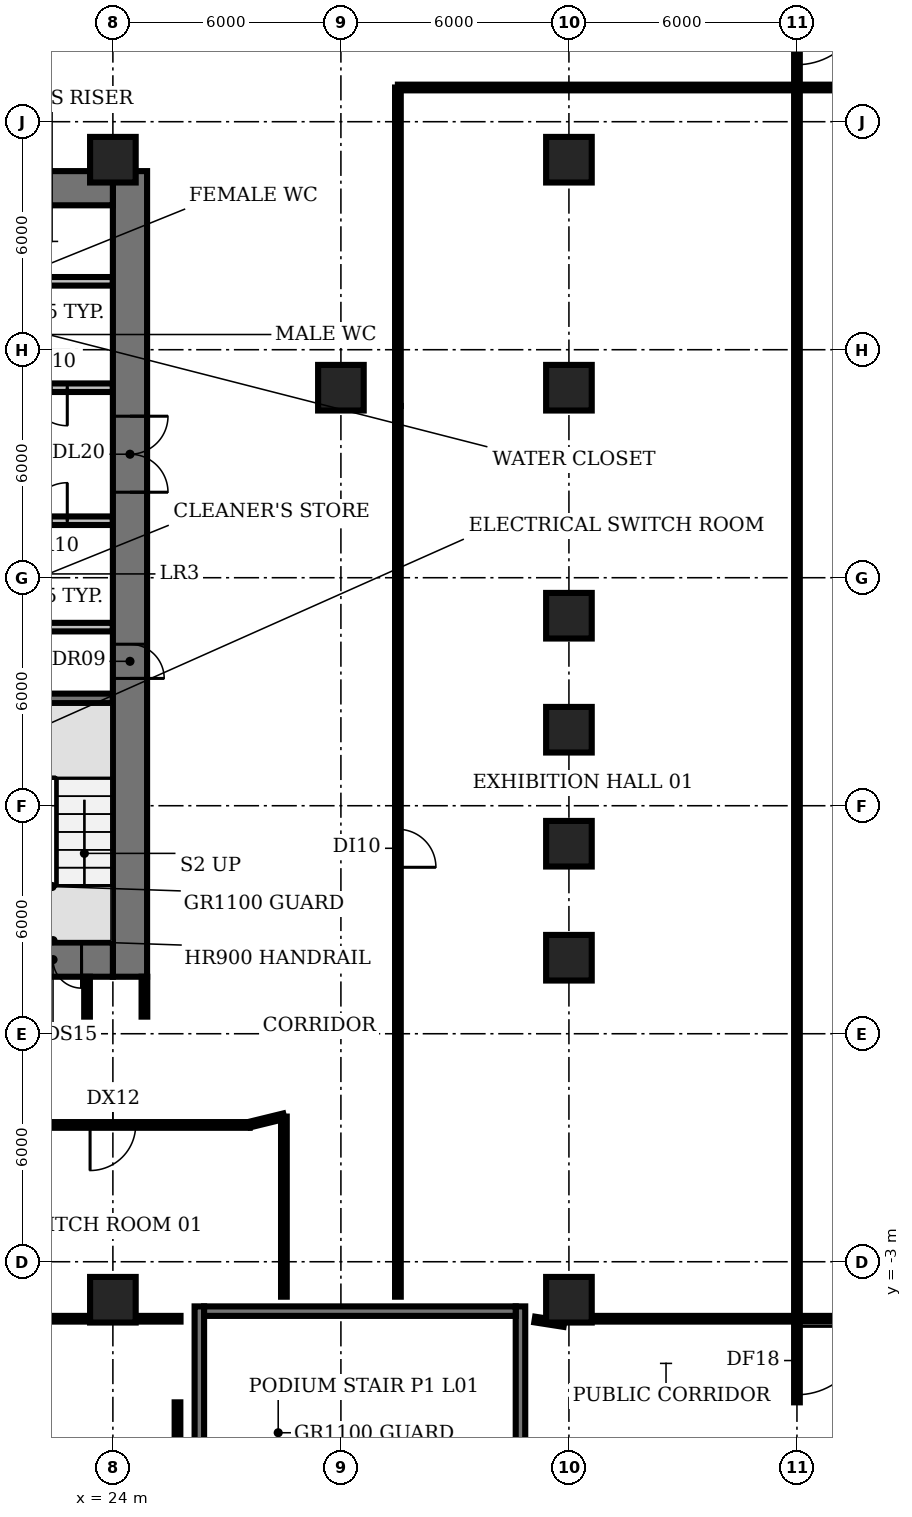
"""IFC4 building model, lengths in metres.
Left out: names, types, materials, properties, quantities, classifications, styles, units other than length and angle.
Written with IfcOpenShell. Run it as: python <this file> out.ifc"""

import sys

from ifc_helpers import new_model, si_unit, direction, frame, frame_2d, origin, origin_2d, place, context, subcontext, project, spatial, rectangle, extrude, element, fill, save


model = new_model("IFC4")
c1 = context("Model", 3, precision=1e-05, world=origin(), true_north=direction((0.0, 1.0)))
c2 = subcontext(c1, "Body", "Model", "MODEL_VIEW")
j1 = project(units=[si_unit("LENGTHUNIT", "METRE"), si_unit("PLANEANGLEUNIT", "RADIAN")], contexts=[c1])
p1 = place(None, origin())
s1 = spatial("IfcSite", under=j1, at=p1, CompositionType="ELEMENT")
p2 = place(p1, origin())
s2 = spatial("IfcBuilding", under=s1, at=p2, CompositionType="ELEMENT")
p3 = place(p2, frame((0.0, 0.0, 6.0)))
s3 = spatial("IfcBuildingStorey", under=s2, at=p3, CompositionType="ELEMENT", Elevation=6.0)
for number, where, z_axis, x_axis in (
    (1, (24.0, -4.0, 0.0), (0.0, 0.0, 1.0), (1.0, 0.0, 0.0)),
    (2, (24.0, 26.0, 0.0), (0.0, 0.0, 1.0), (1.0, 0.0, 0.0)),
    (3, (30.0, 20.0, 0.0), (0.0, 0.0, 1.0), (1.0, 0.0, 0.0)),
    (4, (36.0, -4.0, 0.0), (0.0, 0.0, 1.0), (1.0, 0.0, 0.0)),
    (5, (36.0, 5.0, 0.0), (0.0, 0.0, 1.0), (1.0, 0.0, 0.0)),
    (6, (36.0, 8.0, 0.0), (0.0, 0.0, 1.0), (1.0, 0.0, 0.0)),
    (7, (36.0, 11.0, 0.0), (0.0, 0.0, 1.0), (1.0, 0.0, 0.0)),
    (8, (36.0, 14.0, 0.0), (0.0, 0.0, 1.0), (1.0, 0.0, 0.0)),
    (9, (36.0, 20.0, 0.0), (0.0, 0.0, 1.0), (1.0, 0.0, 0.0)),
    (10, (36.0, 26.0, 0.0), (0.0, 0.0, 1.0), (1.0, 0.0, 0.0)),
):
    element("IfcColumn", number, at=place(p3, frame(where, z_axis=z_axis, x_axis=x_axis)), inside=s3, PredefinedType="COLUMN", context=c2, shape_type="SweptSolid", body=[
        extrude(rectangle(XDim=1.2, YDim=1.2, at=origin_2d()), origin(), (0.0, 0.0, 1.0), 4.6),
    ])
p4 = place(p3, frame((20.85, 11.825, 0.0), z_axis=(0.0, 0.0, 1.0), x_axis=(1.0, 0.0, 0.0)))
e11 = element("IfcWall", 11, at=p4, inside=s3, PredefinedType="SHEAR", context=c2, shape_type="SweptSolid", body=[
    extrude(rectangle(XDim=3.15, YDim=0.25, at=frame_2d((1.575, 0.0))), origin(), (0.0, 0.0, 1.0), 4.6),
])
p5 = place(p3, frame((16.6, 13.7, 0.0), z_axis=(0.0, 0.0, 1.0), x_axis=(1.0, 0.0, 0.0)))
e12 = element("IfcWall", 12, at=p5, inside=s3, PredefinedType="PARTITIONING", context=c2, shape_type="SweptSolid", body=[
    extrude(rectangle(XDim=7.4, YDim=0.225, at=frame_2d((3.7, 0.0))), origin(), (0.0, 0.0, 1.0), 4.6),
])
p6 = place(p3, frame((9.4, 16.5, 0.0), z_axis=(0.0, 0.0, 1.0), x_axis=(1.0, 0.0, 0.0)))
e13 = element("IfcWall", 13, at=p6, inside=s3, PredefinedType="PARTITIONING", context=c2, shape_type="SweptSolid", body=[
    extrude(rectangle(XDim=14.6, YDim=0.225, at=frame_2d((7.3, 0.0))), origin(), (0.0, 0.0, 1.0), 4.6),
])
p7 = place(p6, frame((0.75, 0.0, 0.0)))
e14 = element("IfcOpeningElement", 14, at=p7, cuts=e13, PredefinedType="OPENING", context=c2, shape_type="SweptSolid", body=[
    extrude(rectangle(XDim=1.1, YDim=2.1, at=frame_2d((0.55, 1.05))), frame((0.0, 0.123, 0.0), z_axis=(0.0, -1.0, 0.0), x_axis=(1.0, 0.0, 0.0)), (0.0, 0.0, 1.0), 0.245),
])
p8 = place(p6, frame((3.55, 0.0, 0.0)))
e15 = element("IfcOpeningElement", 15, at=p8, cuts=e13, PredefinedType="OPENING", context=c2, shape_type="SweptSolid", body=[
    extrude(rectangle(XDim=1.1, YDim=2.1, at=frame_2d((0.55, 1.05))), frame((0.0, 0.123, 0.0), z_axis=(0.0, -1.0, 0.0), x_axis=(1.0, 0.0, 0.0)), (0.0, 0.0, 1.0), 0.245),
])
p9 = place(p6, frame((6.35, 0.0, 0.0)))
e16 = element("IfcOpeningElement", 16, at=p9, cuts=e13, PredefinedType="OPENING", context=c2, shape_type="SweptSolid", body=[
    extrude(rectangle(XDim=1.1, YDim=2.1, at=frame_2d((0.55, 1.05))), frame((0.0, 0.123, 0.0), z_axis=(0.0, -1.0, 0.0), x_axis=(1.0, 0.0, 0.0)), (0.0, 0.0, 1.0), 0.245),
])
p10 = place(p6, frame((9.15, 0.0, 0.0)))
e17 = element("IfcOpeningElement", 17, at=p10, cuts=e13, PredefinedType="OPENING", context=c2, shape_type="SweptSolid", body=[
    extrude(rectangle(XDim=1.1, YDim=2.1, at=frame_2d((0.55, 1.05))), frame((0.0, 0.123, 0.0), z_axis=(0.0, -1.0, 0.0), x_axis=(1.0, 0.0, 0.0)), (0.0, 0.0, 1.0), 0.245),
])
p11 = place(p6, frame((12.4, 0.0, 0.0)))
e18 = element("IfcOpeningElement", 18, at=p11, cuts=e13, PredefinedType="OPENING", context=c2, shape_type="SweptSolid", body=[
    extrude(rectangle(XDim=1.0, YDim=2.1, at=frame_2d((0.5, 1.05))), frame((0.0, 0.123, 0.0), z_axis=(0.0, -1.0, 0.0), x_axis=(1.0, 0.0, 0.0)), (0.0, 0.0, 1.0), 0.245),
])
p12 = place(p3, frame((24.0, 20.0, 0.0), z_axis=(0.0, 0.0, 1.0), x_axis=(-1.0, 0.0, 0.0)))
e19 = element("IfcWall", 19, at=p12, inside=s3, PredefinedType="PARTITIONING", context=c2, shape_type="SweptSolid", body=[
    extrude(rectangle(XDim=14.6, YDim=0.225, at=frame_2d((7.3, 0.0))), origin(), (0.0, 0.0, 1.0), 4.6),
])
p13 = place(p12, frame((11.35, 0.0, 0.0)))
e20 = element("IfcOpeningElement", 20, at=p13, cuts=e19, PredefinedType="OPENING", context=c2, shape_type="SweptSolid", body=[
    extrude(rectangle(XDim=1.0, YDim=2.1, at=frame_2d((0.5, 1.05))), frame((0.0, 0.123, 0.0), z_axis=(0.0, -1.0, 0.0), x_axis=(1.0, 0.0, 0.0)), (0.0, 0.0, 1.0), 0.245),
])
p14 = place(p12, frame((5.775, 0.0, 0.0)))
e21 = element("IfcOpeningElement", 21, at=p14, cuts=e19, PredefinedType="OPENING", context=c2, shape_type="SweptSolid", body=[
    extrude(rectangle(XDim=1.0, YDim=2.1, at=frame_2d((0.5, 1.05))), frame((0.0, 0.123, 0.0), z_axis=(0.0, -1.0, 0.0), x_axis=(1.0, 0.0, 0.0)), (0.0, 0.0, 1.0), 0.245),
])
p15 = place(p12, frame((1.2, 0.0, 0.0)))
e22 = element("IfcOpeningElement", 22, at=p15, cuts=e19, PredefinedType="OPENING", context=c2, shape_type="SweptSolid", body=[
    extrude(rectangle(XDim=1.0, YDim=2.1, at=frame_2d((0.5, 1.05))), frame((0.0, 0.123, 0.0), z_axis=(0.0, -1.0, 0.0), x_axis=(1.0, 0.0, 0.0)), (0.0, 0.0, 1.0), 0.245),
])
p16 = place(p3, frame((9.4, 22.8, 0.0), z_axis=(0.0, 0.0, 1.0), x_axis=(1.0, 0.0, 0.0)))
e23 = element("IfcWall", 23, at=p16, inside=s3, PredefinedType="PARTITIONING", context=c2, shape_type="SweptSolid", body=[
    extrude(rectangle(XDim=14.6, YDim=0.225, at=frame_2d((7.3, 0.0))), origin(), (0.0, 0.0, 1.0), 4.6),
])
p17 = place(p3, frame((24.45, 25.7, 0.0), z_axis=(0.0, 0.0, 1.0), x_axis=(0.0, -1.0, 0.0)))
e24 = element("IfcWall", 24, at=p17, inside=s3, PredefinedType="SHEAR", context=c2, shape_type="SweptSolid", body=[
    extrude(rectangle(XDim=21.2, YDim=0.9, at=frame_2d((10.6, 0.0))), origin(), (0.0, 0.0, 1.0), 4.6),
])
p18 = place(p17, frame((12.45, 0.0, 0.0)))
e25 = element("IfcOpeningElement", 25, at=p18, cuts=e24, PredefinedType="OPENING", context=c2, shape_type="SweptSolid", body=[
    extrude(rectangle(XDim=0.9, YDim=2.1, at=frame_2d((0.45, 1.05))), frame((0.0, 0.46, 0.0), z_axis=(0.0, -1.0, 0.0), x_axis=(1.0, 0.0, 0.0)), (0.0, 0.0, 1.0), 0.92),
])
p19 = place(p17, frame((6.45, 0.0, 0.0)))
e26 = element("IfcOpeningElement", 26, at=p19, cuts=e24, PredefinedType="OPENING", context=c2, shape_type="SweptSolid", body=[
    extrude(rectangle(XDim=2.0, YDim=2.1, at=frame_2d((1.0, 1.05))), frame((0.0, 0.46, 0.0), z_axis=(0.0, -1.0, 0.0), x_axis=(1.0, 0.0, 0.0)), (0.0, 0.0, 1.0), 0.92),
])
p20 = place(p3, frame((24.0, 4.95, 0.0), z_axis=(0.0, 0.0, 1.0), x_axis=(-1.0, 0.0, 0.0)))
e27 = element("IfcWall", 27, at=p20, inside=s3, PredefinedType="SHEAR", context=c2, shape_type="SweptSolid", body=[
    extrude(rectangle(XDim=18.0, YDim=0.9, at=frame_2d((9.0, 0.0))), origin(), (0.0, 0.0, 1.0), 4.6),
])
p21 = place(p20, frame((15.675, 0.0, 0.0)))
e28 = element("IfcOpeningElement", 28, at=p21, cuts=e27, PredefinedType="OPENING", context=c2, shape_type="SweptSolid", body=[
    extrude(rectangle(XDim=1.5, YDim=2.1, at=frame_2d((0.75, 1.05))), frame((0.0, 0.46, 0.0), z_axis=(0.0, -1.0, 0.0), x_axis=(1.0, 0.0, 0.0)), (0.0, 0.0, 1.0), 0.92),
])
p22 = place(p20, frame((0.825, 0.0, 0.0)))
e29 = element("IfcOpeningElement", 29, at=p22, cuts=e27, PredefinedType="OPENING", context=c2, shape_type="SweptSolid", body=[
    extrude(rectangle(XDim=1.5, YDim=2.1, at=frame_2d((0.75, 1.05))), frame((0.0, 0.46, 0.0), z_axis=(0.0, -1.0, 0.0), x_axis=(1.0, 0.0, 0.0)), (0.0, 0.0, 1.0), 0.92),
])
p23 = place(p20, frame((13.0, 0.0, 0.0)))
e30 = element("IfcOpeningElement", 30, at=p23, cuts=e27, PredefinedType="OPENING", context=c2, shape_type="SweptSolid", body=[
    extrude(rectangle(XDim=1.2, YDim=2.1, at=frame_2d((0.6, 1.05))), frame((0.0, 0.46, 0.0), z_axis=(0.0, -1.0, 0.0), x_axis=(1.0, 0.0, 0.0)), (0.0, 0.0, 1.0), 0.92),
])
p24 = place(p20, frame((4.9, 0.0, 0.0)))
e31 = element("IfcOpeningElement", 31, at=p24, cuts=e27, PredefinedType="OPENING", context=c2, shape_type="SweptSolid", body=[
    extrude(rectangle(XDim=1.0, YDim=2.1, at=frame_2d((0.5, 1.05))), frame((0.0, 0.46, 0.0), z_axis=(0.0, -1.0, 0.0), x_axis=(1.0, 0.0, 0.0)), (0.0, 0.0, 1.0), 0.92),
])
p25 = place(p3, frame((6.0, 25.25, 0.0), z_axis=(0.0, 0.0, 1.0), x_axis=(1.0, 0.0, 0.0)))
e32 = element("IfcWall", 32, at=p25, inside=s3, PredefinedType="SHEAR", context=c2, shape_type="SweptSolid", body=[
    extrude(rectangle(XDim=18.0, YDim=0.9, at=frame_2d((9.0, 0.0))), origin(), (0.0, 0.0, 1.0), 4.6),
])
for number, where, z_axis, x_axis in (
    (33, (26.275, -8.825, 0.0), (0.0, 0.0, 1.0), (0.0, 1.0, 0.0)),
    (34, (34.725, -8.825, 0.0), (0.0, 0.0, 1.0), (0.0, 1.0, 0.0)),
):
    element("IfcWall", number, at=place(p3, frame(where, z_axis=z_axis, x_axis=x_axis)), inside=s3, PredefinedType="SHEAR", context=c2, shape_type="SweptSolid", body=[
        extrude(rectangle(XDim=4.65, YDim=0.25, at=frame_2d((2.325, 0.0))), origin(), (0.0, 0.0, 1.0), 4.6),
    ])
p26 = place(p3, frame((26.4, -4.3, 0.0), z_axis=(0.0, 0.0, 1.0), x_axis=(1.0, 0.0, 0.0)))
e35 = element("IfcWall", 35, at=p26, inside=s3, PredefinedType="SHEAR", context=c2, shape_type="SweptSolid", body=[
    extrude(rectangle(XDim=8.2, YDim=0.25, at=frame_2d((4.1, 0.0))), origin(), (0.0, 0.0, 1.0), 4.6),
])
p27 = place(p3, frame((20.5, -4.5, 0.0), z_axis=(0.0, 0.0, 1.0), x_axis=(1.0, 0.0, 0.0)))
e36 = element("IfcWall", 36, at=p27, inside=s3, PredefinedType="PARTITIONING", context=c2, shape_type="SweptSolid", body=[
    extrude(rectangle(XDim=3.04, YDim=0.15, at=frame_2d((1.52, 0.0))), origin(), (0.0, 0.0, 1.0), 3.18),
])
p28 = place(p3, frame((23.32, 3.45, 0.0), z_axis=(0.0, 0.0, 1.0), x_axis=(0.0, 1.0, 0.0)))
e37 = element("IfcWall", 37, at=p28, inside=s3, PredefinedType="PARTITIONING", context=c2, shape_type="SweptSolid", body=[
    extrude(rectangle(XDim=1.05, YDim=0.15, at=frame_2d((0.525, 0.0))), origin(), (0.0, 0.0, 1.0), 3.18),
])
p29 = place(p3, frame((24.46, -4.5, 0.0), z_axis=(0.0, 0.0, 1.0), x_axis=(1.0, 0.0, 0.0)))
e38 = element("IfcWall", 38, at=p29, inside=s3, PredefinedType="PARTITIONING", context=c2, shape_type="SweptSolid", body=[
    extrude(rectangle(XDim=1.32, YDim=0.15, at=frame_2d((0.66, 0.0))), origin(), (0.0, 0.0, 1.0), 3.18),
])
p30 = place(p3, frame((24.83, 3.45, 0.0), z_axis=(0.0, 0.0, 1.0), x_axis=(0.0, 1.0, 0.0)))
e39 = element("IfcWall", 39, at=p30, inside=s3, PredefinedType="PARTITIONING", context=c2, shape_type="SweptSolid", body=[
    extrude(rectangle(XDim=1.05, YDim=0.15, at=frame_2d((0.525, 0.0))), origin(), (0.0, 0.0, 1.0), 3.18),
])
p31 = place(p3, frame((25.7, -10.03, 0.0), z_axis=(0.0, 0.0, 1.0), x_axis=(0.0, 1.0, 0.0)))
e40 = element("IfcWall", 40, at=p31, inside=s3, PredefinedType="PARTITIONING", context=c2, shape_type="SweptSolid", body=[
    extrude(rectangle(XDim=3.33, YDim=0.15, at=frame_2d((1.665, 0.0))), origin(), (0.0, 0.0, 1.0), 3.18),
])
p32 = place(p3, frame((27.6, 0.6, 0.0), z_axis=(0.0, 0.0, 1.0), x_axis=(-1.0, 0.0, 0.0)))
e41 = element("IfcWall", 41, at=p32, inside=s3, PredefinedType="PARTITIONING", context=c2, shape_type="SweptSolid", body=[
    extrude(rectangle(XDim=7.1, YDim=0.15, at=frame_2d((3.55, 0.0))), origin(), (0.0, 0.0, 1.0), 3.18),
])
p33 = place(p32, frame((3.0, 0.0, 0.0)))
e42 = element("IfcOpeningElement", 42, at=p33, cuts=e41, PredefinedType="OPENING", context=c2, shape_type="SweptSolid", body=[
    extrude(rectangle(XDim=1.2, YDim=2.1, at=frame_2d((0.6, 1.05))), frame((0.0, 0.085, 0.0), z_axis=(0.0, -1.0, 0.0), x_axis=(1.0, 0.0, 0.0)), (0.0, 0.0, 1.0), 0.17),
])
p34 = place(p3, frame((27.6, 0.61, 0.0), z_axis=(0.0, 0.0, 1.0), x_axis=(0.971400357327, 0.237447564284, 0.0)))
e43 = element("IfcWall", 43, at=p34, inside=s3, PredefinedType="PARTITIONING", context=c2, shape_type="SweptSolid", body=[
    extrude(rectangle(XDim=0.927, YDim=0.15, at=frame_2d((0.463, 0.0))), origin(), (0.0, 0.0, 1.0), 3.18),
])
p35 = place(p3, frame((28.5, -3.92, 0.0), z_axis=(0.0, 0.0, 1.0), x_axis=(0.0, 1.0, 0.0)))
e44 = element("IfcWall", 44, at=p35, inside=s3, PredefinedType="PARTITIONING", context=c2, shape_type="SweptSolid", body=[
    extrude(rectangle(XDim=4.74, YDim=0.15, at=frame_2d((2.37, 0.0))), origin(), (0.0, 0.0, 1.0), 3.18),
])
p36 = place(p3, frame((31.5, 19.52, 0.0), z_axis=(0.0, 0.0, 1.0), x_axis=(0.0, -1.0, 0.0)))
e45 = element("IfcWall", 45, at=p36, inside=s3, PredefinedType="PARTITIONING", context=c2, shape_type="SweptSolid", body=[
    extrude(rectangle(XDim=23.44, YDim=0.15, at=frame_2d((11.72, 0.0))), origin(), (0.0, 0.0, 1.0), 3.18),
])
p37 = place(p36, frame((11.14, 0.0, 0.0)))
e46 = element("IfcOpeningElement", 46, at=p37, cuts=e45, PredefinedType="OPENING", context=c2, shape_type="SweptSolid", body=[
    extrude(rectangle(XDim=1.0, YDim=2.1, at=frame_2d((0.5, 1.05))), frame((0.0, 0.085, 0.0), z_axis=(0.0, -1.0, 0.0), x_axis=(1.0, 0.0, 0.0)), (0.0, 0.0, 1.0), 0.17),
])
p38 = place(p3, frame((31.5, 19.52, 0.0), z_axis=(0.0, 0.0, 1.0), x_axis=(0.0, 1.0, 0.0)))
e47 = element("IfcWall", 47, at=p38, inside=s3, PredefinedType="PARTITIONING", context=c2, shape_type="SweptSolid", body=[
    extrude(rectangle(XDim=8.38, YDim=0.15, at=frame_2d((4.19, 0.0))), origin(), (0.0, 0.0, 1.0), 3.18),
])
p39 = place(p3, frame((31.5, 27.9, 0.0), z_axis=(0.0, 0.0, 1.0), x_axis=(1.0, 0.0, 0.0)))
e48 = element("IfcWall", 48, at=p39, inside=s3, PredefinedType="PARTITIONING", context=c2, shape_type="SweptSolid", body=[
    extrude(rectangle(XDim=21.0, YDim=0.15, at=frame_2d((10.5, 0.0))), origin(), (0.0, 0.0, 1.0), 3.18),
])
p40 = place(p3, frame((35.1, -4.52, 0.0), z_axis=(0.0, 0.0, 1.0), x_axis=(0.988098486873, -0.153822560892, 0.0)))
e49 = element("IfcWall", 49, at=p40, inside=s3, PredefinedType="PARTITIONING", context=c2, shape_type="SweptSolid", body=[
    extrude(rectangle(XDim=0.779, YDim=0.15, at=frame_2d((0.39, 0.0))), origin(), (0.0, 0.0, 1.0), 3.18),
])
p41 = place(p3, frame((36.46, -4.5, 0.0), z_axis=(0.0, 0.0, 1.0), x_axis=(1.0, 0.0, 0.0)))
e50 = element("IfcWall", 50, at=p41, inside=s3, PredefinedType="PARTITIONING", context=c2, shape_type="SweptSolid", body=[
    extrude(rectangle(XDim=11.08, YDim=0.15, at=frame_2d((5.54, 0.0))), origin(), (0.0, 0.0, 1.0), 3.18),
])
p42 = place(p3, frame((42.0, -4.5, 0.0), z_axis=(0.0, 0.0, 1.0), x_axis=(0.0, -1.0, 0.0)))
e51 = element("IfcWall", 51, at=p42, inside=s3, PredefinedType="PARTITIONING", context=c2, shape_type="SweptSolid", body=[
    extrude(rectangle(XDim=2.2, YDim=0.15, at=frame_2d((1.1, 0.0))), origin(), (0.0, 0.0, 1.0), 3.18),
])
p43 = place(p42, frame((0.2, 0.0, 0.0)))
e52 = element("IfcOpeningElement", 52, at=p43, cuts=e51, PredefinedType="OPENING", context=c2, shape_type="SweptSolid", body=[
    extrude(rectangle(XDim=1.8, YDim=2.1, at=frame_2d((0.9, 1.05))), frame((0.0, 0.085, 0.0), z_axis=(0.0, -1.0, 0.0), x_axis=(1.0, 0.0, 0.0)), (0.0, 0.0, 1.0), 0.17),
])
p44 = place(p3, frame((42.0, -4.5, 0.0), z_axis=(0.0, 0.0, 1.0), x_axis=(0.0, 1.0, 0.0)))
e53 = element("IfcWall", 53, at=p44, inside=s3, PredefinedType="PARTITIONING", context=c2, shape_type="SweptSolid", body=[
    extrude(rectangle(XDim=32.4, YDim=0.15, at=frame_2d((16.2, 0.0))), origin(), (0.0, 0.0, 1.0), 3.18),
])
p45 = place(p3, frame((42.0, 30.9, 0.0), z_axis=(0.0, 0.0, 1.0), x_axis=(0.0, -1.0, 0.0)))
e54 = element("IfcWall", 54, at=p45, inside=s3, PredefinedType="PARTITIONING", context=c2, shape_type="SweptSolid", body=[
    extrude(rectangle(XDim=3.0, YDim=0.15, at=frame_2d((1.5, 0.0))), origin(), (0.0, 0.0, 1.0), 3.18),
])
p46 = place(p45, frame((0.6, 0.0, 0.0)))
e55 = element("IfcOpeningElement", 55, at=p46, cuts=e54, PredefinedType="OPENING", context=c2, shape_type="SweptSolid", body=[
    extrude(rectangle(XDim=1.8, YDim=2.1, at=frame_2d((0.9, 1.05))), frame((0.0, 0.085, 0.0), z_axis=(0.0, -1.0, 0.0), x_axis=(1.0, 0.0, 0.0)), (0.0, 0.0, 1.0), 0.17),
])
p47 = place(p11, origin())
e56 = element("IfcDoor", 56, at=p47, inside=s3, OperationType="SINGLE_SWING_RIGHT", PredefinedType="DOOR", context=c2, shape_type="SweptSolid", body=[
    extrude(rectangle(XDim=1.0, YDim=2.1, at=frame_2d((0.5, 1.05))), frame((0.0, 0.025, 0.0), z_axis=(0.0, -1.0, 0.0), x_axis=(1.0, 0.0, 0.0)), (0.0, 0.0, 1.0), 0.05),
])
fill(e18, e56)
p48 = place(p15, origin())
e57 = element("IfcDoor", 57, at=p48, inside=s3, OperationType="SINGLE_SWING_LEFT", PredefinedType="DOOR", context=c2, shape_type="SweptSolid", body=[
    extrude(rectangle(XDim=1.0, YDim=2.1, at=frame_2d((0.5, 1.05))), frame((0.0, 0.025, 0.0), z_axis=(0.0, -1.0, 0.0), x_axis=(1.0, 0.0, 0.0)), (0.0, 0.0, 1.0), 0.05),
])
fill(e22, e57)
p49 = place(p18, origin())
e58 = element("IfcDoor", 58, at=p49, inside=s3, OperationType="SINGLE_SWING_RIGHT", PredefinedType="DOOR", context=c2, shape_type="SweptSolid", body=[
    extrude(rectangle(XDim=0.9, YDim=2.1, at=frame_2d((0.45, 1.05))), frame((0.0, -0.39, 0.0), z_axis=(0.0, -1.0, 0.0), x_axis=(1.0, 0.0, 0.0)), (0.0, 0.0, 1.0), 0.05),
])
fill(e25, e58)
p50 = place(p19, origin())
e59 = element("IfcDoor", 59, at=p50, inside=s3, OperationType="DOUBLE_DOOR_SINGLE_SWING", PredefinedType="DOOR", context=c2, shape_type="SweptSolid", body=[
    extrude(rectangle(XDim=2.0, YDim=2.1, at=frame_2d((1.0, 1.05))), frame((0.0, 0.025, 0.0), z_axis=(0.0, -1.0, 0.0), x_axis=(1.0, 0.0, 0.0)), (0.0, 0.0, 1.0), 0.05),
])
fill(e26, e59)
p51 = place(p22, origin())
e60 = element("IfcDoor", 60, at=p51, inside=s3, OperationType="DOUBLE_DOOR_SINGLE_SWING", PredefinedType="DOOR", context=c2, shape_type="SweptSolid", body=[
    extrude(rectangle(XDim=1.5, YDim=2.1, at=frame_2d((0.75, 1.05))), frame((0.0, 0.025, 0.0), z_axis=(0.0, -1.0, 0.0), x_axis=(1.0, 0.0, 0.0)), (0.0, 0.0, 1.0), 0.05),
])
fill(e29, e60)
p52 = place(p33, origin())
e61 = element("IfcDoor", 61, at=p52, inside=s3, OperationType="SINGLE_SWING_RIGHT", PredefinedType="DOOR", context=c2, shape_type="SweptSolid", body=[
    extrude(rectangle(XDim=1.2, YDim=2.1, at=frame_2d((0.6, 1.05))), frame((0.0, 0.025, 0.0), z_axis=(0.0, -1.0, 0.0), x_axis=(1.0, 0.0, 0.0)), (0.0, 0.0, 1.0), 0.05),
])
fill(e42, e61)
p53 = place(p37, origin())
e62 = element("IfcDoor", 62, at=p53, inside=s3, OperationType="SINGLE_SWING_RIGHT", PredefinedType="DOOR", context=c2, shape_type="SweptSolid", body=[
    extrude(rectangle(XDim=1.0, YDim=2.1, at=frame_2d((0.5, 1.05))), frame((0.0, 0.025, 0.0), z_axis=(0.0, -1.0, 0.0), x_axis=(1.0, 0.0, 0.0)), (0.0, 0.0, 1.0), 0.05),
])
fill(e46, e62)
p54 = place(p43, origin())
e63 = element("IfcDoor", 63, at=p54, inside=s3, OperationType="SINGLE_SWING_LEFT", PredefinedType="DOOR", context=c2, shape_type="SweptSolid", body=[
    extrude(rectangle(XDim=1.8, YDim=2.1, at=frame_2d((0.9, 1.05))), frame((0.0, 0.025, 0.0), z_axis=(0.0, -1.0, 0.0), x_axis=(1.0, 0.0, 0.0)), (0.0, 0.0, 1.0), 0.05),
])
fill(e52, e63)
p55 = place(p46, origin())
e64 = element("IfcDoor", 64, at=p55, inside=s3, OperationType="SINGLE_SWING_LEFT", PredefinedType="DOOR", context=c2, shape_type="SweptSolid", body=[
    extrude(rectangle(XDim=1.8, YDim=2.1, at=frame_2d((0.9, 1.05))), frame((0.0, 0.025, 0.0), z_axis=(0.0, -1.0, 0.0), x_axis=(1.0, 0.0, 0.0)), (0.0, 0.0, 1.0), 0.05),
])
fill(e55, e64)
save(model, sys.argv[1])
